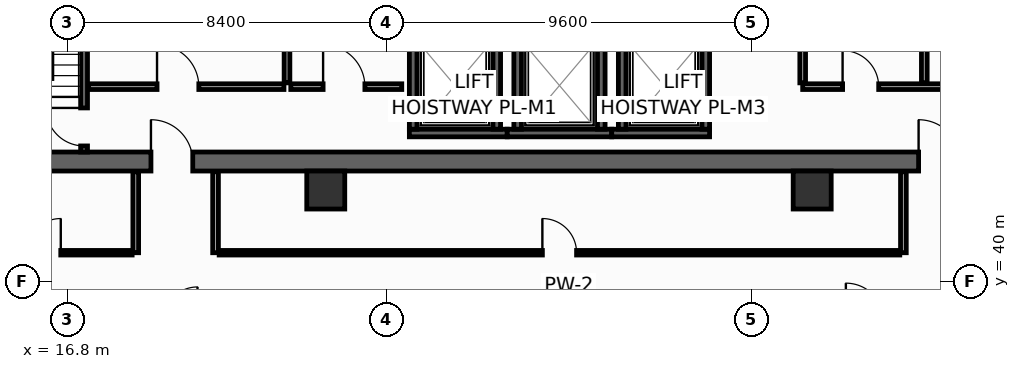
"""IFC4 building model, lengths in metres.
Left out: names, types, materials, properties, quantities, classifications, styles, units other than length and angle.
Written with IfcOpenShell. Run it as: python <this file> out.ifc"""

import sys

from ifc_helpers import new_model, si_unit, direction, frame, frame_2d, origin, origin_2d, place, context, subcontext, project, spatial, rectangle, hollow_rectangle, extrude, element, fill, save


model = new_model("IFC4")
c1 = context("Model", 3, precision=1e-05, world=origin(), true_north=direction((0.0, 1.0)))
c2 = subcontext(c1, "Body", "Model", "MODEL_VIEW")
j1 = project(units=[si_unit("LENGTHUNIT", "METRE"), si_unit("PLANEANGLEUNIT", "RADIAN")], contexts=[c1])
p1 = place(None, origin())
s1 = spatial("IfcSite", under=j1, at=p1, CompositionType="ELEMENT")
p2 = place(p1, origin())
s2 = spatial("IfcBuilding", under=s1, at=p2, CompositionType="ELEMENT")
p3 = place(p2, frame((0.0, 0.0, 167.6)))
s3 = spatial("IfcBuildingStorey", under=s2, at=p3, CompositionType="ELEMENT", Elevation=167.6)
p4 = place(p3, frame((13.6, 43.15, 0.0), z_axis=(0.0, 0.0, 1.0), x_axis=(1.0, 0.0, 0.0)))
e1 = element("IfcWall", 1, at=p4, inside=s3, PredefinedType="SHEAR", context=c2, shape_type="SweptSolid", body=[
    extrude(rectangle(XDim=32.7, YDim=0.5, at=frame_2d((16.35, 0.0))), origin(), (0.0, 0.0, 1.0), 3.55),
])
p5 = place(p4, frame((5.4, 0.0, 0.0)))
e2 = element("IfcOpeningElement", 2, at=p5, cuts=e1, PredefinedType="OPENING", context=c2, shape_type="SweptSolid", body=[
    extrude(rectangle(XDim=1.1, YDim=2.15, at=frame_2d((0.55, 1.075))), frame((0.0, 0.26, 0.0), z_axis=(0.0, -1.0, 0.0), x_axis=(1.0, 0.0, 0.0)), (0.0, 0.0, 1.0), 0.52),
])
p6 = place(p4, frame((25.6, 0.0, 0.0)))
e3 = element("IfcOpeningElement", 3, at=p6, cuts=e1, PredefinedType="OPENING", context=c2, shape_type="SweptSolid", body=[
    extrude(rectangle(XDim=1.1, YDim=2.15, at=frame_2d((0.55, 1.075))), frame((0.0, 0.26, 0.0), z_axis=(0.0, -1.0, 0.0), x_axis=(1.0, 0.0, 0.0)), (0.0, 0.0, 1.0), 0.52),
])
for number, where, z_axis, x_axis in (
    (4, (23.6, 42.4, 0.0), (0.0, 0.0, 1.0), (1.0, 0.0, 0.0)),
    (5, (36.4, 42.4, 0.0), (0.0, 0.0, 1.0), (1.0, 0.0, 0.0)),
):
    element("IfcColumn", number, at=place(p3, frame(where, z_axis=z_axis, x_axis=x_axis)), inside=s3, PredefinedType="COLUMN", context=c2, shape_type="SweptSolid", body=[
        extrude(hollow_rectangle(XDim=1.0, YDim=1.0, WallThickness=0.045, at=origin_2d()), origin(), (0.0, 0.0, 1.0), 3.8),
    ])
p7 = place(p3, frame((25.8, 43.9, 0.0), z_axis=(0.0, 0.0, 1.0), x_axis=(1.0, 0.0, 0.0)))
e6 = element("IfcWall", 6, at=p7, inside=s3, PredefinedType="SHEAR", context=c2, shape_type="SweptSolid", body=[
    extrude(rectangle(XDim=2.575, YDim=0.2, at=frame_2d((1.288, 0.0))), origin(), (0.0, 0.0, 1.0), 3.55),
])
for number, where, z_axis, x_axis in (
    (7, (25.9, 44.0, 0.0), (0.0, 0.0, 1.0), (0.0, 1.0, 0.0)),
    (8, (28.1, 44.0, 0.0), (0.0, 0.0, 1.0), (0.0, 1.0, 0.0)),
):
    element("IfcWall", number, at=place(p3, frame(where, z_axis=z_axis, x_axis=x_axis)), inside=s3, PredefinedType="SHEAR", context=c2, shape_type="SweptSolid", body=[
        extrude(rectangle(XDim=2.3, YDim=0.2, at=frame_2d((1.15, 0.0))), origin(), (0.0, 0.0, 1.0), 3.55),
    ])
p8 = place(p3, frame((28.375, 43.9, 0.0), z_axis=(0.0, 0.0, 1.0), x_axis=(1.0, 0.0, 0.0)))
e9 = element("IfcWall", 9, at=p8, inside=s3, PredefinedType="SHEAR", context=c2, shape_type="SweptSolid", body=[
    extrude(rectangle(XDim=2.75, YDim=0.2, at=frame_2d((1.375, 0.0))), origin(), (0.0, 0.0, 1.0), 3.55),
])
for number, where, z_axis, x_axis in (
    (10, (28.65, 44.0, 0.0), (0.0, 0.0, 1.0), (0.0, 1.0, 0.0)),
    (11, (30.85, 44.0, 0.0), (0.0, 0.0, 1.0), (0.0, 1.0, 0.0)),
):
    element("IfcWall", number, at=place(p3, frame(where, z_axis=z_axis, x_axis=x_axis)), inside=s3, PredefinedType="SHEAR", context=c2, shape_type="SweptSolid", body=[
        extrude(rectangle(XDim=2.3, YDim=0.2, at=frame_2d((1.15, 0.0))), origin(), (0.0, 0.0, 1.0), 3.55),
    ])
p9 = place(p3, frame((31.125, 43.9, 0.0), z_axis=(0.0, 0.0, 1.0), x_axis=(1.0, 0.0, 0.0)))
e12 = element("IfcWall", 12, at=p9, inside=s3, PredefinedType="SHEAR", context=c2, shape_type="SweptSolid", body=[
    extrude(rectangle(XDim=2.575, YDim=0.2, at=frame_2d((1.288, 0.0))), origin(), (0.0, 0.0, 1.0), 3.55),
])
for number, where, z_axis, x_axis in (
    (13, (31.4, 44.0, 0.0), (0.0, 0.0, 1.0), (0.0, 1.0, 0.0)),
    (14, (33.6, 44.0, 0.0), (0.0, 0.0, 1.0), (0.0, 1.0, 0.0)),
):
    element("IfcWall", number, at=place(p3, frame(where, z_axis=z_axis, x_axis=x_axis)), inside=s3, PredefinedType="SHEAR", context=c2, shape_type="SweptSolid", body=[
        extrude(rectangle(XDim=2.3, YDim=0.2, at=frame_2d((1.15, 0.0))), origin(), (0.0, 0.0, 1.0), 3.55),
    ])
p10 = place(p3, frame((17.24, 43.4, 0.0), z_axis=(0.0, 0.0, 1.0), x_axis=(0.0, 1.0, 0.0)))
e15 = element("IfcWall", 15, at=p10, inside=s3, PredefinedType="SHEAR", context=c2, shape_type="SweptSolid", body=[
    extrude(rectangle(XDim=10.4, YDim=0.18, at=frame_2d((5.2, 0.0))), origin(), (0.0, 0.0, 1.0), 3.55),
])
p11 = place(p10, frame((0.16, 0.0, 0.0)))
e16 = element("IfcOpeningElement", 16, at=p11, cuts=e15, PredefinedType="OPENING", context=c2, shape_type="SweptSolid", body=[
    extrude(rectangle(XDim=1.0, YDim=2.15, at=frame_2d((0.5, 1.075))), frame((0.0, 0.1, 0.0), z_axis=(0.0, -1.0, 0.0), x_axis=(1.0, 0.0, 0.0)), (0.0, 0.0, 1.0), 0.2),
])
p12 = place(p3, frame((17.36, 45.12, 0.0), z_axis=(0.0, 0.0, 1.0), x_axis=(1.0, 0.0, 0.0)))
e17 = element("IfcWall", 17, at=p12, inside=s3, PredefinedType="PARTITIONING", context=c2, shape_type="SweptSolid", body=[
    extrude(rectangle(XDim=5.14, YDim=0.15, at=frame_2d((2.57, 0.0))), origin(), (0.0, 0.0, 1.0), 3.55),
])
p13 = place(p12, frame((1.8, 0.0, 0.0)))
e18 = element("IfcOpeningElement", 18, at=p13, cuts=e17, PredefinedType="OPENING", context=c2, shape_type="SweptSolid", body=[
    extrude(rectangle(XDim=1.1, YDim=2.15, at=frame_2d((0.55, 1.075))), frame((0.0, 0.085, 0.0), z_axis=(0.0, -1.0, 0.0), x_axis=(1.0, 0.0, 0.0)), (0.0, 0.0, 1.0), 0.17),
])
p14 = place(p3, frame((22.58, 50.55, 0.0), z_axis=(0.0, 0.0, 1.0), x_axis=(0.0, -1.0, 0.0)))
e19 = element("IfcWall", 19, at=p14, inside=s3, PredefinedType="PARTITIONING", context=c2, shape_type="SweptSolid", body=[
    extrude(rectangle(XDim=5.33, YDim=0.15, at=frame_2d((2.665, 0.0))), origin(), (0.0, 0.0, 1.0), 3.55),
])
p15 = place(p14, frame((1.8, 0.0, 0.0)))
e20 = element("IfcOpeningElement", 20, at=p15, cuts=e19, PredefinedType="OPENING", context=c2, shape_type="SweptSolid", body=[
    extrude(rectangle(XDim=1.1, YDim=2.15, at=frame_2d((0.55, 1.075))), frame((0.0, 0.085, 0.0), z_axis=(0.0, -1.0, 0.0), x_axis=(1.0, 0.0, 0.0)), (0.0, 0.0, 1.0), 0.17),
])
p16 = place(p3, frame((22.68, 45.12, 0.0), z_axis=(0.0, 0.0, 1.0), x_axis=(1.0, 0.0, 0.0)))
e21 = element("IfcWall", 21, at=p16, inside=s3, PredefinedType="PARTITIONING", context=c2, shape_type="SweptSolid", body=[
    extrude(rectangle(XDim=2.92, YDim=0.15, at=frame_2d((1.46, 0.0))), origin(), (0.0, 0.0, 1.0), 3.55),
])
p17 = place(p16, frame((0.85, 0.0, 0.0)))
e22 = element("IfcOpeningElement", 22, at=p17, cuts=e21, PredefinedType="OPENING", context=c2, shape_type="SweptSolid", body=[
    extrude(rectangle(XDim=1.1, YDim=2.15, at=frame_2d((0.55, 1.075))), frame((0.0, 0.085, 0.0), z_axis=(0.0, -1.0, 0.0), x_axis=(1.0, 0.0, 0.0)), (0.0, 0.0, 1.0), 0.17),
])
p18 = place(p3, frame((36.15, 45.12, 0.0), z_axis=(0.0, 0.0, 1.0), x_axis=(1.0, 0.0, 0.0)))
e23 = element("IfcWall", 23, at=p18, inside=s3, PredefinedType="PARTITIONING", context=c2, shape_type="SweptSolid", body=[
    extrude(rectangle(XDim=6.35, YDim=0.15, at=frame_2d((3.175, 0.0))), origin(), (0.0, 0.0, 1.0), 3.55),
])
p19 = place(p18, frame((1.05, 0.0, 0.0)))
e24 = element("IfcOpeningElement", 24, at=p19, cuts=e23, PredefinedType="OPENING", context=c2, shape_type="SweptSolid", body=[
    extrude(rectangle(XDim=0.95, YDim=2.15, at=frame_2d((0.475, 1.075))), frame((0.0, 0.085, 0.0), z_axis=(0.0, -1.0, 0.0), x_axis=(1.0, 0.0, 0.0)), (0.0, 0.0, 1.0), 0.17),
])
p20 = place(p18, frame((4.25, 0.0, 0.0)))
e25 = element("IfcOpeningElement", 25, at=p20, cuts=e23, PredefinedType="OPENING", context=c2, shape_type="SweptSolid", body=[
    extrude(rectangle(XDim=0.95, YDim=2.15, at=frame_2d((0.475, 1.075))), frame((0.0, 0.085, 0.0), z_axis=(0.0, -1.0, 0.0), x_axis=(1.0, 0.0, 0.0)), (0.0, 0.0, 1.0), 0.17),
])
for number, where, z_axis, x_axis in (
    (26, (36.15, 45.22, 0.0), (0.0, 0.0, 1.0), (0.0, 1.0, 0.0)),
    (27, (39.35, 45.22, 0.0), (0.0, 0.0, 1.0), (0.0, 1.0, 0.0)),
):
    element("IfcWall", number, at=place(p3, frame(where, z_axis=z_axis, x_axis=x_axis)), inside=s3, PredefinedType="PARTITIONING", context=c2, shape_type="SweptSolid", body=[
        extrude(rectangle(XDim=2.63, YDim=0.15, at=frame_2d((1.315, 0.0))), origin(), (0.0, 0.0, 1.0), 3.55),
    ])
for number, where, z_axis, x_axis in (
    (28, (18.6, 40.75, 0.0), (0.0, 0.0, 1.0), (0.0, 1.0, 0.0)),
    (29, (20.7, 40.75, 0.0), (0.0, 0.0, 1.0), (0.0, 1.0, 0.0)),
    (30, (38.8, 40.75, 0.0), (0.0, 0.0, 1.0), (0.0, 1.0, 0.0)),
):
    element("IfcWall", number, at=place(p3, frame(where, z_axis=z_axis, x_axis=x_axis)), inside=s3, PredefinedType="PARTITIONING", context=c2, shape_type="SweptSolid", body=[
        extrude(rectangle(XDim=2.13, YDim=0.15, at=frame_2d((1.065, 0.0))), origin(), (0.0, 0.0, 1.0), 3.55),
    ])
p21 = place(p3, frame((13.85, 40.75, 0.0), z_axis=(0.0, 0.0, 1.0), x_axis=(1.0, 0.0, 0.0)))
e31 = element("IfcWall", 31, at=p21, inside=s3, PredefinedType="PARTITIONING", context=c2, shape_type="SweptSolid", body=[
    extrude(rectangle(XDim=4.655, YDim=0.12, at=frame_2d((2.327, 0.0))), origin(), (0.0, 0.0, 1.0), 3.55),
])
p22 = place(p21, frame((1.877, 0.0, 0.0)))
e32 = element("IfcOpeningElement", 32, at=p22, cuts=e31, PredefinedType="OPENING", context=c2, shape_type="SweptSolid", body=[
    extrude(rectangle(XDim=0.9, YDim=2.1, at=frame_2d((0.45, 1.05))), frame((0.0, 0.07, 0.0), z_axis=(0.0, -1.0, 0.0), x_axis=(1.0, 0.0, 0.0)), (0.0, 0.0, 1.0), 0.14),
])
p23 = place(p3, frame((20.795, 40.75, 0.0), z_axis=(0.0, 0.0, 1.0), x_axis=(1.0, 0.0, 0.0)))
e33 = element("IfcWall", 33, at=p23, inside=s3, PredefinedType="PARTITIONING", context=c2, shape_type="SweptSolid", body=[
    extrude(rectangle(XDim=17.91, YDim=0.12, at=frame_2d((8.955, 0.0))), origin(), (0.0, 0.0, 1.0), 2.835),
])
p24 = place(p23, frame((8.505, 0.0, 0.0)))
e34 = element("IfcOpeningElement", 34, at=p24, cuts=e33, PredefinedType="OPENING", context=c2, shape_type="SweptSolid", body=[
    extrude(rectangle(XDim=0.9, YDim=2.1, at=frame_2d((0.45, 1.05))), frame((0.0, 0.07, 0.0), z_axis=(0.0, -1.0, 0.0), x_axis=(1.0, 0.0, 0.0)), (0.0, 0.0, 1.0), 0.14),
])
p25 = place(p11, origin())
e35 = element("IfcDoor", 35, at=p25, inside=s3, OperationType="SINGLE_SWING_RIGHT", PredefinedType="DOOR", context=c2, shape_type="SweptSolid", body=[
    extrude(rectangle(XDim=1.0, YDim=2.15, at=frame_2d((0.5, 1.075))), frame((0.0, 0.025, 0.0), z_axis=(0.0, -1.0, 0.0), x_axis=(1.0, 0.0, 0.0)), (0.0, 0.0, 1.0), 0.05),
])
fill(e16, e35)
p26 = place(p13, origin())
e36 = element("IfcDoor", 36, at=p26, inside=s3, OperationType="SINGLE_SWING_LEFT", PredefinedType="DOOR", context=c2, shape_type="SweptSolid", body=[
    extrude(rectangle(XDim=1.1, YDim=2.15, at=frame_2d((0.55, 1.075))), frame((0.0, 0.025, 0.0), z_axis=(0.0, -1.0, 0.0), x_axis=(1.0, 0.0, 0.0)), (0.0, 0.0, 1.0), 0.05),
])
fill(e18, e36)
p27 = place(p17, origin())
e37 = element("IfcDoor", 37, at=p27, inside=s3, OperationType="SINGLE_SWING_LEFT", PredefinedType="DOOR", context=c2, shape_type="SweptSolid", body=[
    extrude(rectangle(XDim=1.1, YDim=2.15, at=frame_2d((0.55, 1.075))), frame((0.0, 0.025, 0.0), z_axis=(0.0, -1.0, 0.0), x_axis=(1.0, 0.0, 0.0)), (0.0, 0.0, 1.0), 0.05),
])
fill(e22, e37)
p28 = place(p5, origin())
e38 = element("IfcDoor", 38, at=p28, inside=s3, OperationType="SINGLE_SWING_LEFT", PredefinedType="DOOR", context=c2, shape_type="SweptSolid", body=[
    extrude(rectangle(XDim=1.1, YDim=2.15, at=frame_2d((0.55, 1.075))), frame((0.0, 0.025, 0.0), z_axis=(0.0, -1.0, 0.0), x_axis=(1.0, 0.0, 0.0)), (0.0, 0.0, 1.0), 0.05),
])
fill(e2, e38)
p29 = place(p6, origin())
e39 = element("IfcDoor", 39, at=p29, inside=s3, OperationType="SINGLE_SWING_LEFT", PredefinedType="DOOR", context=c2, shape_type="SweptSolid", body=[
    extrude(rectangle(XDim=1.1, YDim=2.15, at=frame_2d((0.55, 1.075))), frame((0.0, 0.025, 0.0), z_axis=(0.0, -1.0, 0.0), x_axis=(1.0, 0.0, 0.0)), (0.0, 0.0, 1.0), 0.05),
])
fill(e3, e39)
p30 = place(p19, origin())
e40 = element("IfcDoor", 40, at=p30, inside=s3, OperationType="SINGLE_SWING_LEFT", PredefinedType="DOOR", context=c2, shape_type="SweptSolid", body=[
    extrude(rectangle(XDim=0.95, YDim=2.15, at=frame_2d((0.475, 1.075))), frame((0.0, 0.025, 0.0), z_axis=(0.0, -1.0, 0.0), x_axis=(1.0, 0.0, 0.0)), (0.0, 0.0, 1.0), 0.05),
])
fill(e24, e40)
p31 = place(p22, origin())
e41 = element("IfcDoor", 41, at=p31, inside=s3, OperationType="SINGLE_SWING_RIGHT", PredefinedType="DOOR", context=c2, shape_type="SweptSolid", body=[
    extrude(rectangle(XDim=0.9, YDim=2.1, at=frame_2d((0.45, 1.05))), frame((0.0, 0.025, 0.0), z_axis=(0.0, -1.0, 0.0), x_axis=(1.0, 0.0, 0.0)), (0.0, 0.0, 1.0), 0.05),
])
fill(e32, e41)
p32 = place(p24, origin())
e42 = element("IfcDoor", 42, at=p32, inside=s3, OperationType="SINGLE_SWING_LEFT", PredefinedType="DOOR", context=c2, shape_type="SweptSolid", body=[
    extrude(rectangle(XDim=0.9, YDim=2.1, at=frame_2d((0.45, 1.05))), frame((0.0, 0.025, 0.0), z_axis=(0.0, -1.0, 0.0), x_axis=(1.0, 0.0, 0.0)), (0.0, 0.0, 1.0), 0.05),
])
fill(e34, e42)
save(model, sys.argv[1])
